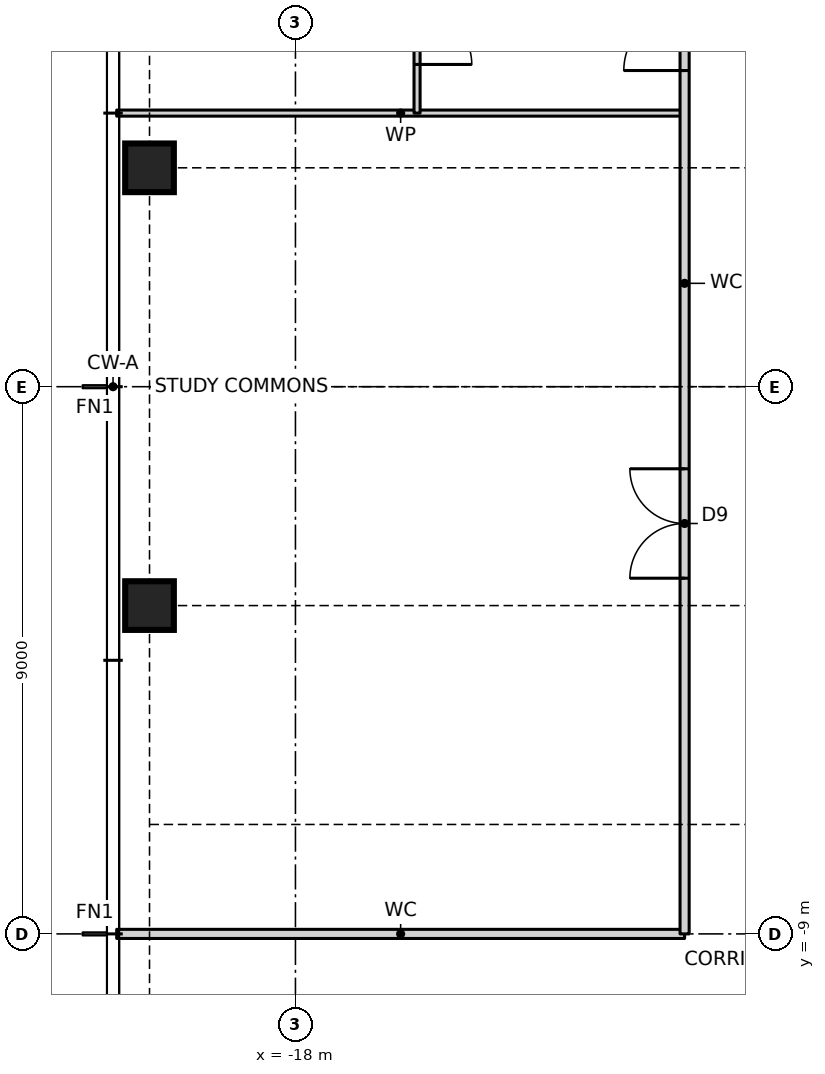
"""IFC4 building model, lengths in metres.
Left out: names, types, materials, properties, quantities, classifications, styles, units other than length and angle.
Written with IfcOpenShell. Run it as: python <this file> out.ifc"""

import sys

from ifc_helpers import new_model, si_unit, direction, frame, frame_2d, origin, origin_2d, place, context, subcontext, project, spatial, rectangle, hollow_rectangle, extrude, element, fill, save


model = new_model("IFC4")
c1 = context("Model", 3, precision=1e-05, world=origin(), true_north=direction((0.0, 1.0)))
c2 = subcontext(c1, "Body", "Model", "MODEL_VIEW")
j1 = project(units=[si_unit("LENGTHUNIT", "METRE"), si_unit("PLANEANGLEUNIT", "RADIAN")], contexts=[c1])
p1 = place(None, origin())
s1 = spatial("IfcSite", under=j1, at=p1, CompositionType="ELEMENT")
p2 = place(p1, origin())
s2 = spatial("IfcBuilding", under=s1, at=p2, CompositionType="ELEMENT")
p3 = place(p2, frame((0.0, 0.0, 119.0)))
s3 = spatial("IfcBuildingStorey", under=s2, at=p3, CompositionType="ELEMENT", Elevation=119.0)
for number, where, z_axis, x_axis in (
    (1, (-20.4, 3.6, 0.0), (0.0, 0.0, 1.0), (1.0, 0.0, 0.0)),
    (2, (-20.4, -3.6, 0.0), (0.0, 0.0, 1.0), (1.0, 0.0, 0.0)),
):
    element("IfcColumn", number, at=place(p3, frame(where, z_axis=z_axis, x_axis=x_axis)), inside=s3, PredefinedType="COLUMN", context=c2, shape_type="SweptSolid", body=[
        extrude(hollow_rectangle(XDim=0.8, YDim=0.8, WallThickness=0.07, at=origin_2d()), origin(), (0.0, 0.0, 1.0), 3.5),
    ])
p4 = place(p3, frame((-20.94, -9.0, 0.0), z_axis=(0.0, 0.0, 1.0), x_axis=(1.0, 0.0, 0.0)))
e3 = element("IfcWall", 3, at=p4, inside=s3, PredefinedType="PARTITIONING", context=c2, shape_type="SweptSolid", body=[
    extrude(rectangle(XDim=9.34, YDim=0.15, at=frame_2d((4.67, 0.0))), origin(), (0.0, 0.0, 1.0), 3.27),
])
p5 = place(p3, frame((-20.94, 4.5, 0.0), z_axis=(0.0, 0.0, 1.0), x_axis=(1.0, 0.0, 0.0)))
e4 = element("IfcWall", 4, at=p5, inside=s3, PredefinedType="PARTITIONING", context=c2, shape_type="SweptSolid", body=[
    extrude(rectangle(XDim=9.34, YDim=0.1, at=frame_2d((4.67, 0.0))), origin(), (0.0, 0.0, 1.0), 3.27),
])
p6 = place(p3, frame((-11.6, -9.0, 0.0), z_axis=(0.0, 0.0, 1.0), x_axis=(0.0, 1.0, 0.0)))
e5 = element("IfcWall", 5, at=p6, inside=s3, PredefinedType="PARTITIONING", context=c2, shape_type="SweptSolid", body=[
    extrude(rectangle(XDim=21.4, YDim=0.15, at=frame_2d((10.7, 0.0))), origin(), (0.0, 0.0, 1.0), 3.27),
])
p7 = place(p6, frame((14.2, 0.0, 0.0)))
e6 = element("IfcOpeningElement", 6, at=p7, cuts=e5, PredefinedType="OPENING", context=c2, shape_type="SweptSolid", body=[
    extrude(rectangle(XDim=1.0, YDim=2.1, at=frame_2d((0.5, 1.05))), frame((0.0, 0.085, 0.0), z_axis=(0.0, -1.0, 0.0), x_axis=(1.0, 0.0, 0.0)), (0.0, 0.0, 1.0), 0.17),
])
p8 = place(p6, frame((5.85, 0.0, 0.0)))
e7 = element("IfcOpeningElement", 7, at=p8, cuts=e5, PredefinedType="OPENING", context=c2, shape_type="SweptSolid", body=[
    extrude(rectangle(XDim=1.8, YDim=2.1, at=frame_2d((0.9, 1.05))), frame((0.0, 0.085, 0.0), z_axis=(0.0, -1.0, 0.0), x_axis=(1.0, 0.0, 0.0)), (0.0, 0.0, 1.0), 0.17),
])
p9 = place(p3, frame((-16.0, 4.5, 0.0), z_axis=(0.0, 0.0, 1.0), x_axis=(0.0, 1.0, 0.0)))
e8 = element("IfcWall", 8, at=p9, inside=s3, PredefinedType="PARTITIONING", context=c2, shape_type="SweptSolid", body=[
    extrude(rectangle(XDim=9.0, YDim=0.1, at=frame_2d((4.5, 0.0))), origin(), (0.0, 0.0, 1.0), 3.27),
])
p10 = place(p9, frame((7.3, 0.0, 0.0)))
e9 = element("IfcOpeningElement", 9, at=p10, cuts=e8, PredefinedType="OPENING", context=c2, shape_type="SweptSolid", body=[
    extrude(rectangle(XDim=0.9, YDim=2.1, at=frame_2d((0.45, 1.05))), frame((0.0, 0.06, 0.0), z_axis=(0.0, -1.0, 0.0), x_axis=(1.0, 0.0, 0.0)), (0.0, 0.0, 1.0), 0.12),
])
p11 = place(p9, frame((0.8, 0.0, 0.0)))
e10 = element("IfcOpeningElement", 10, at=p11, cuts=e8, PredefinedType="OPENING", context=c2, shape_type="SweptSolid", body=[
    extrude(rectangle(XDim=0.9, YDim=2.1, at=frame_2d((0.45, 1.05))), frame((0.0, 0.06, 0.0), z_axis=(0.0, -1.0, 0.0), x_axis=(1.0, 0.0, 0.0)), (0.0, 0.0, 1.0), 0.12),
])
p12 = place(p11, frame((0.9, 0.0, 0.0), z_axis=(0.0, 0.0, 1.0), x_axis=(-1.0, 0.0, 0.0)))
e11 = element("IfcDoor", 11, at=p12, inside=s3, OperationType="SINGLE_SWING_RIGHT", PredefinedType="DOOR", context=c2, shape_type="SweptSolid", body=[
    extrude(rectangle(XDim=0.9, YDim=2.1, at=frame_2d((0.45, 1.05))), frame((0.0, 0.025, 0.0), z_axis=(0.0, -1.0, 0.0), x_axis=(1.0, 0.0, 0.0)), (0.0, 0.0, 1.0), 0.05),
])
fill(e10, e11)
p13 = place(p7, origin())
e12 = element("IfcDoor", 12, at=p13, inside=s3, OperationType="SINGLE_SWING_LEFT", PredefinedType="DOOR", context=c2, shape_type="SweptSolid", body=[
    extrude(rectangle(XDim=1.0, YDim=2.1, at=frame_2d((0.5, 1.05))), frame((0.0, 0.025, 0.0), z_axis=(0.0, -1.0, 0.0), x_axis=(1.0, 0.0, 0.0)), (0.0, 0.0, 1.0), 0.05),
])
fill(e6, e12)
p14 = place(p8, origin())
e13 = element("IfcDoor", 13, at=p14, inside=s3, OperationType="DOUBLE_DOOR_SINGLE_SWING", PredefinedType="DOOR", context=c2, shape_type="SweptSolid", body=[
    extrude(rectangle(XDim=1.8, YDim=2.1, at=frame_2d((0.9, 1.05))), frame((0.0, 0.025, 0.0), z_axis=(0.0, -1.0, 0.0), x_axis=(1.0, 0.0, 0.0)), (0.0, 0.0, 1.0), 0.05),
])
fill(e7, e13)
save(model, sys.argv[1])
